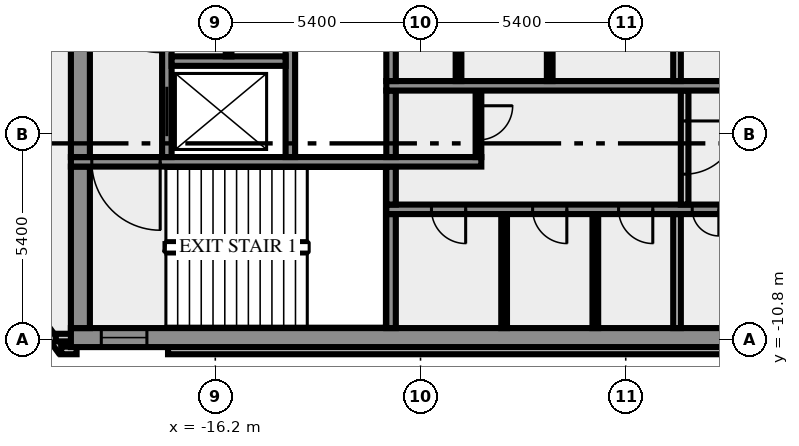
"""IFC4 building model, lengths in metres.
Left out: names, types, materials, properties, quantities, classifications, styles, units other than length and angle.
Written with IfcOpenShell. Run it as: python <this file> out.ifc"""

import sys

from ifc_helpers import new_model, si_unit, direction, frame, frame_2d, origin, place, context, subcontext, project, spatial, rectangle, extrude, element, fill, save


model = new_model("IFC4")
c1 = context("Model", 3, precision=1e-05, world=origin(), true_north=direction((0.0, 1.0)))
c2 = subcontext(c1, "Body", "Model", "MODEL_VIEW")
j1 = project(units=[si_unit("LENGTHUNIT", "METRE"), si_unit("PLANEANGLEUNIT", "RADIAN")], contexts=[c1])
p1 = place(None, origin())
s1 = spatial("IfcSite", under=j1, at=p1, CompositionType="ELEMENT")
p2 = place(p1, origin())
s2 = spatial("IfcBuilding", under=s1, at=p2, CompositionType="ELEMENT")
p3 = place(p2, frame((0.0, 0.0, 210.0)))
s3 = spatial("IfcBuildingStorey", under=s2, at=p3, CompositionType="ELEMENT", Elevation=210.0)
p4 = place(p3, frame((-21.833, -8.909, 0.0), z_axis=(0.0, 0.0, 1.0), x_axis=(0.587766567315, -0.809030569476, 0.0)))
e1 = element("IfcWall", 1, at=p4, inside=s3, PredefinedType="SOLIDWALL", context=c2, shape_type="SweptSolid", body=[
    extrude(rectangle(XDim=2.688, YDim=0.2, at=frame_2d((1.344, 0.0))), origin(), (0.0, 0.0, 1.0), 3.65),
])
p5 = place(p3, frame((-20.256, -11.088, 0.0), z_axis=(0.0, 0.0, 1.0), x_axis=(1.0, 0.0, 0.0)))
e2 = element("IfcWall", 2, at=p5, inside=s3, PredefinedType="SOLIDWALL", context=c2, shape_type="SweptSolid", body=[
    extrude(rectangle(XDim=0.406, YDim=0.2, at=frame_2d((0.203, 0.0))), origin(), (0.0, 0.0, 1.0), 3.65),
])
p6 = place(p3, frame((-17.444, -11.088, 0.0), z_axis=(0.0, 0.0, 1.0), x_axis=(1.0, 0.0, 0.0)))
e3 = element("IfcWall", 3, at=p6, inside=s3, PredefinedType="SOLIDWALL", context=c2, shape_type="SweptSolid", body=[
    extrude(rectangle(XDim=34.888, YDim=0.2, at=frame_2d((17.444, 0.0))), origin(), (0.0, 0.0, 1.0), 3.65),
])
p7 = place(p3, frame((-19.98, -10.75, 0.0), z_axis=(0.0, 0.0, 1.0), x_axis=(-1.0, 0.0, 0.0)))
e4 = element("IfcWall", 4, at=p7, inside=s3, PredefinedType="SOLIDWALL", context=c2, shape_type="SweptSolid", body=[
    extrude(rectangle(XDim=0.417, YDim=0.2, at=frame_2d((0.208, 0.0))), origin(), (0.0, 0.0, 1.0), 3.65),
])
p8 = place(p3, frame((-20.0, -10.75, 0.0), z_axis=(0.0, 0.0, 1.0), x_axis=(1.0, 0.0, 0.0)))
e5 = element("IfcWall", 5, at=p8, inside=s3, PredefinedType="SHEAR", context=c2, shape_type="SweptSolid", body=[
    extrude(rectangle(XDim=40.0, YDim=0.5, at=frame_2d((20.0, 0.0))), origin(), (0.0, 0.0, 1.0), 3.65),
])
p9 = place(p8, frame((0.8, 0.0, 1.0)))
e6 = element("IfcOpeningElement", 6, at=p9, cuts=e5, PredefinedType="OPENING", context=c2, shape_type="SweptSolid", body=[
    extrude(rectangle(XDim=1.2, YDim=1.2, at=frame_2d((0.6, 0.6))), frame((0.0, 0.26, 0.0), z_axis=(0.0, -1.0, 0.0), x_axis=(1.0, 0.0, 0.0)), (0.0, 0.0, 1.0), 0.52),
])
p10 = place(p8, frame((38.0, 0.0, 1.0)))
e7 = element("IfcOpeningElement", 7, at=p10, cuts=e5, PredefinedType="OPENING", context=c2, shape_type="SweptSolid", body=[
    extrude(rectangle(XDim=1.2, YDim=1.2, at=frame_2d((0.6, 0.6))), frame((0.0, 0.26, 0.0), z_axis=(0.0, -1.0, 0.0), x_axis=(1.0, 0.0, 0.0)), (0.0, 0.0, 1.0), 0.52),
])
p11 = place(p3, frame((-19.75, -10.5, 0.0), z_axis=(0.0, 0.0, 1.0), x_axis=(0.0, 1.0, 0.0)))
e8 = element("IfcWall", 8, at=p11, inside=s3, PredefinedType="SHEAR", context=c2, shape_type="SweptSolid", body=[
    extrude(rectangle(XDim=4.25, YDim=0.5, at=frame_2d((2.125, 0.0))), origin(), (0.0, 0.0, 1.0), 3.65),
])
p12 = place(p3, frame((-11.575, -10.5, 0.0), z_axis=(0.0, 0.0, 1.0), x_axis=(0.0, 1.0, 0.0)))
e9 = element("IfcWall", 9, at=p12, inside=s3, PredefinedType="SHEAR", context=c2, shape_type="SweptSolid", body=[
    extrude(rectangle(XDim=3.0, YDim=0.25, at=frame_2d((1.5, 0.0))), origin(), (0.0, 0.0, 1.0), 3.65),
])
for number, where, z_axis, x_axis in (
    (10, (-8.6, -10.5, 0.0), (0.0, 0.0, 1.0), (0.0, 1.0, 0.0)),
    (11, (-6.2, -10.5, 0.0), (0.0, 0.0, 1.0), (0.0, 1.0, 0.0)),
):
    element("IfcWall", number, at=place(p3, frame(where, z_axis=z_axis, x_axis=x_axis)), inside=s3, PredefinedType="PARTITIONING", context=c2, shape_type="SweptSolid", body=[
        extrude(rectangle(XDim=3.0, YDim=0.15, at=frame_2d((1.5, 0.0))), origin(), (0.0, 0.0, 1.0), 3.65),
    ])
p13 = place(p3, frame((-4.05, -10.5, 0.0), z_axis=(0.0, 0.0, 1.0), x_axis=(0.0, 1.0, 0.0)))
e12 = element("IfcWall", 12, at=p13, inside=s3, PredefinedType="SOLIDWALL", context=c2, shape_type="SweptSolid", body=[
    extrude(rectangle(XDim=3.0, YDim=0.2, at=frame_2d((1.5, 0.0))), origin(), (0.0, 0.0, 1.0), 3.65),
])
p14 = place(p3, frame((11.7, -7.375, 0.0), z_axis=(0.0, 0.0, 1.0), x_axis=(-1.0, 0.0, 0.0)))
e13 = element("IfcWall", 13, at=p14, inside=s3, PredefinedType="SHEAR", context=c2, shape_type="SweptSolid", body=[
    extrude(rectangle(XDim=23.4, YDim=0.25, at=frame_2d((11.7, 0.0))), origin(), (0.0, 0.0, 1.0), 3.65),
])
p15 = place(p14, frame((21.312, 0.0, 0.0)))
e14 = element("IfcOpeningElement", 14, at=p15, cuts=e13, PredefinedType="OPENING", context=c2, shape_type="SweptSolid", body=[
    extrude(rectangle(XDim=0.9, YDim=2.1, at=frame_2d((0.45, 1.05))), frame((0.0, 0.135, 0.0), z_axis=(0.0, -1.0, 0.0), x_axis=(1.0, 0.0, 0.0)), (0.0, 0.0, 1.0), 0.27),
])
p16 = place(p14, frame((18.65, 0.0, 0.0)))
e15 = element("IfcOpeningElement", 15, at=p16, cuts=e13, PredefinedType="OPENING", context=c2, shape_type="SweptSolid", body=[
    extrude(rectangle(XDim=0.9, YDim=2.1, at=frame_2d((0.45, 1.05))), frame((0.0, 0.135, 0.0), z_axis=(0.0, -1.0, 0.0), x_axis=(1.0, 0.0, 0.0)), (0.0, 0.0, 1.0), 0.27),
])
p17 = place(p14, frame((16.388, 0.0, 0.0)))
e16 = element("IfcOpeningElement", 16, at=p17, cuts=e13, PredefinedType="OPENING", context=c2, shape_type="SweptSolid", body=[
    extrude(rectangle(XDim=0.9, YDim=2.1, at=frame_2d((0.45, 1.05))), frame((0.0, 0.135, 0.0), z_axis=(0.0, -1.0, 0.0), x_axis=(1.0, 0.0, 0.0)), (0.0, 0.0, 1.0), 0.27),
])
p18 = place(p14, frame((14.65, 0.0, 0.0)))
e17 = element("IfcOpeningElement", 17, at=p18, cuts=e13, PredefinedType="OPENING", context=c2, shape_type="SweptSolid", body=[
    extrude(rectangle(XDim=0.7, YDim=2.1, at=frame_2d((0.35, 1.05))), frame((0.0, 0.135, 0.0), z_axis=(0.0, -1.0, 0.0), x_axis=(1.0, 0.0, 0.0)), (0.0, 0.0, 1.0), 0.27),
])
p19 = place(p14, frame((13.35, 0.0, 0.0)))
e18 = element("IfcOpeningElement", 18, at=p19, cuts=e13, PredefinedType="OPENING", context=c2, shape_type="SweptSolid", body=[
    extrude(rectangle(XDim=0.9, YDim=2.1, at=frame_2d((0.45, 1.05))), frame((0.0, 0.135, 0.0), z_axis=(0.0, -1.0, 0.0), x_axis=(1.0, 0.0, 0.0)), (0.0, 0.0, 1.0), 0.27),
])
p20 = place(p14, frame((11.975, 0.0, 0.0)))
e19 = element("IfcOpeningElement", 19, at=p20, cuts=e13, PredefinedType="OPENING", context=c2, shape_type="SweptSolid", body=[
    extrude(rectangle(XDim=0.9, YDim=2.1, at=frame_2d((0.45, 1.05))), frame((0.0, 0.135, 0.0), z_axis=(0.0, -1.0, 0.0), x_axis=(1.0, 0.0, 0.0)), (0.0, 0.0, 1.0), 0.27),
])
p21 = place(p14, frame((10.5, 0.0, 0.0)))
e20 = element("IfcOpeningElement", 20, at=p21, cuts=e13, PredefinedType="OPENING", context=c2, shape_type="SweptSolid", body=[
    extrude(rectangle(XDim=0.9, YDim=2.1, at=frame_2d((0.45, 1.05))), frame((0.0, 0.135, 0.0), z_axis=(0.0, -1.0, 0.0), x_axis=(1.0, 0.0, 0.0)), (0.0, 0.0, 1.0), 0.27),
])
p22 = place(p14, frame((8.35, 0.0, 0.0)))
e21 = element("IfcOpeningElement", 21, at=p22, cuts=e13, PredefinedType="OPENING", context=c2, shape_type="SweptSolid", body=[
    extrude(rectangle(XDim=1.1, YDim=2.1, at=frame_2d((0.55, 1.05))), frame((0.0, 0.135, 0.0), z_axis=(0.0, -1.0, 0.0), x_axis=(1.0, 0.0, 0.0)), (0.0, 0.0, 1.0), 0.27),
])
p23 = place(p14, frame((5.85, 0.0, 0.0)))
e22 = element("IfcOpeningElement", 22, at=p23, cuts=e13, PredefinedType="OPENING", context=c2, shape_type="SweptSolid", body=[
    extrude(rectangle(XDim=1.1, YDim=2.1, at=frame_2d((0.55, 1.05))), frame((0.0, 0.135, 0.0), z_axis=(0.0, -1.0, 0.0), x_axis=(1.0, 0.0, 0.0)), (0.0, 0.0, 1.0), 0.27),
])
p24 = place(p14, frame((3.35, 0.0, 0.0)))
e23 = element("IfcOpeningElement", 23, at=p24, cuts=e13, PredefinedType="OPENING", context=c2, shape_type="SweptSolid", body=[
    extrude(rectangle(XDim=1.1, YDim=2.1, at=frame_2d((0.55, 1.05))), frame((0.0, 0.135, 0.0), z_axis=(0.0, -1.0, 0.0), x_axis=(1.0, 0.0, 0.0)), (0.0, 0.0, 1.0), 0.27),
])
p25 = place(p14, frame((0.85, 0.0, 0.0)))
e24 = element("IfcOpeningElement", 24, at=p25, cuts=e13, PredefinedType="OPENING", context=c2, shape_type="SweptSolid", body=[
    extrude(rectangle(XDim=1.1, YDim=2.1, at=frame_2d((0.55, 1.05))), frame((0.0, 0.135, 0.0), z_axis=(0.0, -1.0, 0.0), x_axis=(1.0, 0.0, 0.0)), (0.0, 0.0, 1.0), 0.27),
])
p26 = place(p3, frame((-11.575, -7.25, 0.0), z_axis=(0.0, 0.0, 1.0), x_axis=(0.0, 1.0, 0.0)))
e25 = element("IfcWall", 25, at=p26, inside=s3, PredefinedType="SHEAR", context=c2, shape_type="SweptSolid", body=[
    extrude(rectangle(XDim=1.0, YDim=0.25, at=frame_2d((0.5, 0.0))), origin(), (0.0, 0.0, 1.0), 3.65),
])
p27 = place(p3, frame((-3.85, -4.25, 0.0), z_axis=(0.0, 0.0, 1.0), x_axis=(0.0, -1.0, 0.0)))
e26 = element("IfcWall", 26, at=p27, inside=s3, PredefinedType="SOLIDWALL", context=c2, shape_type="SweptSolid", body=[
    extrude(rectangle(XDim=3.0, YDim=0.2, at=frame_2d((1.5, 0.0))), origin(), (0.0, 0.0, 1.0), 3.65),
])
p28 = place(p27, frame((0.8, 0.0, 0.0)))
e27 = element("IfcOpeningElement", 27, at=p28, cuts=e26, PredefinedType="OPENING", context=c2, shape_type="SweptSolid", body=[
    extrude(rectangle(XDim=1.4, YDim=2.1, at=frame_2d((0.7, 1.05))), frame((0.0, 0.11, 0.0), z_axis=(0.0, -1.0, 0.0), x_axis=(1.0, 0.0, 0.0)), (0.0, 0.0, 1.0), 0.22),
])
p29 = place(p3, frame((-9.2, -6.125, 0.0), z_axis=(0.0, 0.0, 1.0), x_axis=(-1.0, 0.0, 0.0)))
e28 = element("IfcWall", 28, at=p29, inside=s3, PredefinedType="SHEAR", context=c2, shape_type="SweptSolid", body=[
    extrude(rectangle(XDim=10.8, YDim=0.25, at=frame_2d((5.4, 0.0))), origin(), (0.0, 0.0, 1.0), 3.65),
])
p30 = place(p29, frame((8.45, 0.0, 0.0)))
e29 = element("IfcOpeningElement", 29, at=p30, cuts=e28, PredefinedType="OPENING", context=c2, shape_type="SweptSolid", body=[
    extrude(rectangle(XDim=1.8, YDim=2.1, at=frame_2d((0.9, 1.05))), frame((0.0, 0.135, 0.0), z_axis=(0.0, -1.0, 0.0), x_axis=(1.0, 0.0, 0.0)), (0.0, 0.0, 1.0), 0.27),
])
p31 = place(p3, frame((-19.75, -6.0, 0.0), z_axis=(0.0, 0.0, 1.0), x_axis=(0.0, 1.0, 0.0)))
e30 = element("IfcWall", 30, at=p31, inside=s3, PredefinedType="SHEAR", context=c2, shape_type="SweptSolid", body=[
    extrude(rectangle(XDim=4.3, YDim=0.5, at=frame_2d((2.15, 0.0))), origin(), (0.0, 0.0, 1.0), 3.65),
])
p32 = place(p3, frame((-17.475, -6.0, 0.0), z_axis=(0.0, 0.0, 1.0), x_axis=(0.0, 1.0, 0.0)))
e31 = element("IfcWall", 31, at=p32, inside=s3, PredefinedType="SHEAR", context=c2, shape_type="SweptSolid", body=[
    extrude(rectangle(XDim=4.3, YDim=0.25, at=frame_2d((2.15, 0.0))), origin(), (0.0, 0.0, 1.0), 3.65),
])
p33 = place(p32, frame((0.55, 0.0, 0.0)))
e32 = element("IfcOpeningElement", 32, at=p33, cuts=e31, PredefinedType="OPENING", context=c2, shape_type="SweptSolid", body=[
    extrude(rectangle(XDim=1.3, YDim=2.1, at=frame_2d((0.65, 1.05))), frame((0.0, 0.135, 0.0), z_axis=(0.0, -1.0, 0.0), x_axis=(1.0, 0.0, 0.0)), (0.0, 0.0, 1.0), 0.27),
])
p34 = place(p3, frame((-14.225, -6.0, 0.0), z_axis=(0.0, 0.0, 1.0), x_axis=(0.0, 1.0, 0.0)))
e33 = element("IfcWall", 33, at=p34, inside=s3, PredefinedType="SHEAR", context=c2, shape_type="SweptSolid", body=[
    extrude(rectangle(XDim=4.3, YDim=0.25, at=frame_2d((2.15, 0.0))), origin(), (0.0, 0.0, 1.0), 3.65),
])
p35 = place(p3, frame((-11.575, -6.0, 0.0), z_axis=(0.0, 0.0, 1.0), x_axis=(0.0, 1.0, 0.0)))
e34 = element("IfcWall", 34, at=p35, inside=s3, PredefinedType="SHEAR", context=c2, shape_type="SweptSolid", body=[
    extrude(rectangle(XDim=1.75, YDim=0.25, at=frame_2d((0.875, 0.0))), origin(), (0.0, 0.0, 1.0), 3.65),
])
p36 = place(p3, frame((-9.275, -4.25, 0.0), z_axis=(0.0, 0.0, 1.0), x_axis=(0.0, -1.0, 0.0)))
e35 = element("IfcWall", 35, at=p36, inside=s3, PredefinedType="PARTITIONING", context=c2, shape_type="SweptSolid", body=[
    extrude(rectangle(XDim=1.75, YDim=0.15, at=frame_2d((0.875, 0.0))), origin(), (0.0, 0.0, 1.0), 3.65),
])
p37 = place(p36, frame((0.4, 0.0, 0.0)))
e36 = element("IfcOpeningElement", 36, at=p37, cuts=e35, PredefinedType="OPENING", context=c2, shape_type="SweptSolid", body=[
    extrude(rectangle(XDim=0.9, YDim=2.1, at=frame_2d((0.45, 1.05))), frame((0.0, 0.085, 0.0), z_axis=(0.0, -1.0, 0.0), x_axis=(1.0, 0.0, 0.0)), (0.0, 0.0, 1.0), 0.17),
])
p38 = place(p3, frame((-11.7, -4.125, 0.0), z_axis=(0.0, 0.0, 1.0), x_axis=(1.0, 0.0, 0.0)))
e37 = element("IfcWall", 37, at=p38, inside=s3, PredefinedType="SHEAR", context=c2, shape_type="SweptSolid", body=[
    extrude(rectangle(XDim=10.05, YDim=0.25, at=frame_2d((5.025, 0.0))), origin(), (0.0, 0.0, 1.0), 3.65),
])
p39 = place(p3, frame((-11.575, -4.0, 0.0), z_axis=(0.0, 0.0, 1.0), x_axis=(0.0, 1.0, 0.0)))
e38 = element("IfcWall", 38, at=p39, inside=s3, PredefinedType="SHEAR", context=c2, shape_type="SweptSolid", body=[
    extrude(rectangle(XDim=2.3, YDim=0.25, at=frame_2d((1.15, 0.0))), origin(), (0.0, 0.0, 1.0), 3.65),
])
for number, where, z_axis, x_axis in (
    (39, (-9.8, -4.0, 0.0), (0.0, 0.0, 1.0), (0.0, 1.0, 0.0)),
    (40, (-7.4, -4.0, 0.0), (0.0, 0.0, 1.0), (0.0, 1.0, 0.0)),
):
    element("IfcWall", number, at=place(p3, frame(where, z_axis=z_axis, x_axis=x_axis)), inside=s3, PredefinedType="PARTITIONING", context=c2, shape_type="SweptSolid", body=[
        extrude(rectangle(XDim=2.3, YDim=0.15, at=frame_2d((1.15, 0.0))), origin(), (0.0, 0.0, 1.0), 3.65),
    ])
p40 = place(p3, frame((-4.05, -4.0, 0.0), z_axis=(0.0, 0.0, 1.0), x_axis=(0.0, 1.0, 0.0)))
e41 = element("IfcWall", 41, at=p40, inside=s3, PredefinedType="SOLIDWALL", context=c2, shape_type="SweptSolid", body=[
    extrude(rectangle(XDim=2.3, YDim=0.2, at=frame_2d((1.15, 0.0))), origin(), (0.0, 0.0, 1.0), 3.65),
])
p41 = place(p3, frame((-17.35, -3.475, 0.0), z_axis=(0.0, 0.0, 1.0), x_axis=(1.0, 0.0, 0.0)))
e42 = element("IfcWall", 42, at=p41, inside=s3, PredefinedType="SHEAR", context=c2, shape_type="SweptSolid", body=[
    extrude(rectangle(XDim=3.0, YDim=0.25, at=frame_2d((1.5, 0.0))), origin(), (0.0, 0.0, 1.0), 3.65),
])
p42 = place(p3, frame((-15.85, -3.35, 0.0), z_axis=(0.0, 0.0, 1.0), x_axis=(0.0, 1.0, 0.0)))
e43 = element("IfcWall", 43, at=p42, inside=s3, PredefinedType="PARTITIONING", context=c2, shape_type="SweptSolid", body=[
    extrude(rectangle(XDim=1.65, YDim=0.15, at=frame_2d((0.825, 0.0))), origin(), (0.0, 0.0, 1.0), 3.65),
])
p43 = place(p9, origin())
e44 = element("IfcWindow", 44, at=p43, inside=s3, PartitioningType="SINGLE_PANEL", PredefinedType="WINDOW", context=c2, shape_type="SweptSolid", body=[
    extrude(rectangle(XDim=1.2, YDim=1.2, at=frame_2d((0.6, 0.6))), frame((0.0, 0.03, 0.0), z_axis=(0.0, -1.0, 0.0), x_axis=(1.0, 0.0, 0.0)), (0.0, 0.0, 1.0), 0.06),
])
fill(e6, e44)
p44 = place(p15, origin())
e45 = element("IfcDoor", 45, at=p44, inside=s3, OperationType="SINGLE_SWING_RIGHT", PredefinedType="DOOR", context=c2, shape_type="SweptSolid", body=[
    extrude(rectangle(XDim=0.9, YDim=2.1, at=frame_2d((0.45, 1.05))), frame((0.0, 0.025, 0.0), z_axis=(0.0, -1.0, 0.0), x_axis=(1.0, 0.0, 0.0)), (0.0, 0.0, 1.0), 0.05),
])
fill(e14, e45)
p45 = place(p16, origin())
e46 = element("IfcDoor", 46, at=p45, inside=s3, OperationType="SINGLE_SWING_RIGHT", PredefinedType="DOOR", context=c2, shape_type="SweptSolid", body=[
    extrude(rectangle(XDim=0.9, YDim=2.1, at=frame_2d((0.45, 1.05))), frame((0.0, 0.025, 0.0), z_axis=(0.0, -1.0, 0.0), x_axis=(1.0, 0.0, 0.0)), (0.0, 0.0, 1.0), 0.05),
])
fill(e15, e46)
p46 = place(p17, origin())
e47 = element("IfcDoor", 47, at=p46, inside=s3, OperationType="SINGLE_SWING_RIGHT", PredefinedType="DOOR", context=c2, shape_type="SweptSolid", body=[
    extrude(rectangle(XDim=0.9, YDim=2.1, at=frame_2d((0.45, 1.05))), frame((0.0, 0.025, 0.0), z_axis=(0.0, -1.0, 0.0), x_axis=(1.0, 0.0, 0.0)), (0.0, 0.0, 1.0), 0.05),
])
fill(e16, e47)
p47 = place(p18, origin())
e48 = element("IfcDoor", 48, at=p47, inside=s3, OperationType="SINGLE_SWING_RIGHT", PredefinedType="DOOR", context=c2, shape_type="SweptSolid", body=[
    extrude(rectangle(XDim=0.7, YDim=2.1, at=frame_2d((0.35, 1.05))), frame((0.0, 0.025, 0.0), z_axis=(0.0, -1.0, 0.0), x_axis=(1.0, 0.0, 0.0)), (0.0, 0.0, 1.0), 0.05),
])
fill(e17, e48)
p48 = place(p28, origin())
e49 = element("IfcDoor", 49, at=p48, inside=s3, OperationType="DOUBLE_DOOR_SINGLE_SWING", PredefinedType="DOOR", context=c2, shape_type="SweptSolid", body=[
    extrude(rectangle(XDim=1.4, YDim=2.1, at=frame_2d((0.7, 1.05))), frame((0.0, 0.025, 0.0), z_axis=(0.0, -1.0, 0.0), x_axis=(1.0, 0.0, 0.0)), (0.0, 0.0, 1.0), 0.05),
])
fill(e27, e49)
p49 = place(p30, origin())
e50 = element("IfcDoor", 50, at=p49, inside=s3, OperationType="DOUBLE_DOOR_SINGLE_SWING", PredefinedType="DOOR", context=c2, shape_type="SweptSolid", body=[
    extrude(rectangle(XDim=1.8, YDim=2.1, at=frame_2d((0.9, 1.05))), frame((0.0, 0.025, 0.0), z_axis=(0.0, -1.0, 0.0), x_axis=(1.0, 0.0, 0.0)), (0.0, 0.0, 1.0), 0.05),
])
fill(e29, e50)
p50 = place(p33, origin())
e51 = element("IfcDoor", 51, at=p50, inside=s3, OperationType="DOUBLE_DOOR_SLIDING", PredefinedType="DOOR", context=c2, shape_type="SweptSolid", body=[
    extrude(rectangle(XDim=1.3, YDim=2.1, at=frame_2d((0.65, 1.05))), frame((0.0, 0.025, 0.0), z_axis=(0.0, -1.0, 0.0), x_axis=(1.0, 0.0, 0.0)), (0.0, 0.0, 1.0), 0.05),
])
fill(e32, e51)
p51 = place(p37, origin())
e52 = element("IfcDoor", 52, at=p51, inside=s3, OperationType="SINGLE_SWING_LEFT", PredefinedType="DOOR", context=c2, shape_type="SweptSolid", body=[
    extrude(rectangle(XDim=0.9, YDim=2.1, at=frame_2d((0.45, 1.05))), frame((0.0, 0.025, 0.0), z_axis=(0.0, -1.0, 0.0), x_axis=(1.0, 0.0, 0.0)), (0.0, 0.0, 1.0), 0.05),
])
fill(e36, e52)
save(model, sys.argv[1])
